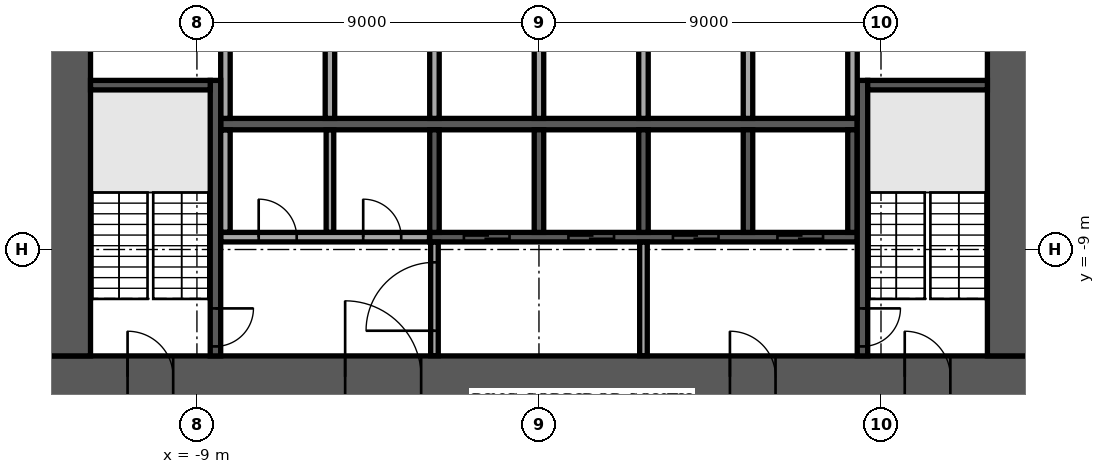
"""IFC4 building model, lengths in metres.
Left out: names, types, materials, properties, quantities, classifications, styles, units other than length and angle.
Written with IfcOpenShell. Run it as: python <this file> out.ifc"""

import sys

from ifc_helpers import new_model, si_unit, direction, frame, frame_2d, origin, place, context, subcontext, project, spatial, rectangle, extrude, element, fill, save


model = new_model("IFC4")
c1 = context("Model", 3, precision=1e-05, world=origin(), true_north=direction((0.0, 1.0)))
c2 = subcontext(c1, "Body", "Model", "MODEL_VIEW")
j1 = project(units=[si_unit("LENGTHUNIT", "METRE"), si_unit("PLANEANGLEUNIT", "RADIAN")], contexts=[c1])
p1 = place(None, origin())
s1 = spatial("IfcSite", under=j1, at=p1, CompositionType="ELEMENT")
p2 = place(p1, origin())
s2 = spatial("IfcBuilding", under=s1, at=p2, CompositionType="ELEMENT")
p3 = place(p2, frame((0.0, 0.0, 102.1)))
s3 = spatial("IfcBuildingStorey", under=s2, at=p3, CompositionType="ELEMENT", Elevation=102.1)
p4 = place(p3, frame((-12.9, -12.35, 0.0), z_axis=(0.0, 0.0, 1.0), x_axis=(1.0, 0.0, 0.0)))
e1 = element("IfcWall", 1, at=p4, inside=s3, PredefinedType="SHEAR", context=c2, shape_type="SweptSolid", body=[
    extrude(rectangle(XDim=25.8, YDim=1.1, at=frame_2d((12.9, 0.0))), origin(), (0.0, 0.0, 1.0), 3.58),
])
p5 = place(p4, frame((7.8, 0.0, 0.0)))
e2 = element("IfcOpeningElement", 2, at=p5, cuts=e1, PredefinedType="OPENING", context=c2, shape_type="SweptSolid", body=[
    extrude(rectangle(XDim=2.0, YDim=2.1, at=frame_2d((1.0, 1.05))), frame((0.0, 0.56, 0.0), z_axis=(0.0, -1.0, 0.0), x_axis=(1.0, 0.0, 0.0)), (0.0, 0.0, 1.0), 1.12),
])
p6 = place(p4, frame((17.925, 0.0, 0.0)))
e3 = element("IfcOpeningElement", 3, at=p6, cuts=e1, PredefinedType="OPENING", context=c2, shape_type="SweptSolid", body=[
    extrude(rectangle(XDim=1.2, YDim=2.1, at=frame_2d((0.6, 1.05))), frame((0.0, 0.56, 0.0), z_axis=(0.0, -1.0, 0.0), x_axis=(1.0, 0.0, 0.0)), (0.0, 0.0, 1.0), 1.12),
])
p7 = place(p4, frame((2.075, 0.0, 0.0)))
e4 = element("IfcOpeningElement", 4, at=p7, cuts=e1, PredefinedType="OPENING", context=c2, shape_type="SweptSolid", body=[
    extrude(rectangle(XDim=1.2, YDim=2.1, at=frame_2d((0.6, 1.05))), frame((0.0, 0.56, 0.0), z_axis=(0.0, -1.0, 0.0), x_axis=(1.0, 0.0, 0.0)), (0.0, 0.0, 1.0), 1.12),
])
p8 = place(p4, frame((22.525, 0.0, 0.0)))
e5 = element("IfcOpeningElement", 5, at=p8, cuts=e1, PredefinedType="OPENING", context=c2, shape_type="SweptSolid", body=[
    extrude(rectangle(XDim=1.2, YDim=2.1, at=frame_2d((0.6, 1.05))), frame((0.0, 0.56, 0.0), z_axis=(0.0, -1.0, 0.0), x_axis=(1.0, 0.0, 0.0)), (0.0, 0.0, 1.0), 1.12),
])
p9 = place(p3, frame((12.35, -11.8, 0.0), z_axis=(0.0, 0.0, 1.0), x_axis=(0.0, 1.0, 0.0)))
e6 = element("IfcWall", 6, at=p9, inside=s3, PredefinedType="SHEAR", context=c2, shape_type="SweptSolid", body=[
    extrude(rectangle(XDim=23.6, YDim=1.1, at=frame_2d((11.8, 0.0))), origin(), (0.0, 0.0, 1.0), 3.58),
])
p10 = place(p9, frame((10.6, 0.0, 0.0)))
e7 = element("IfcOpeningElement", 7, at=p10, cuts=e6, PredefinedType="OPENING", context=c2, shape_type="SweptSolid", body=[
    extrude(rectangle(XDim=2.4, YDim=2.4, at=frame_2d((1.2, 1.2))), frame((0.0, 0.56, 0.0), z_axis=(0.0, -1.0, 0.0), x_axis=(1.0, 0.0, 0.0)), (0.0, 0.0, 1.0), 1.12),
])
p11 = place(p3, frame((-12.35, -11.8, 0.0), z_axis=(0.0, 0.0, 1.0), x_axis=(0.0, 1.0, 0.0)))
e8 = element("IfcWall", 8, at=p11, inside=s3, PredefinedType="SHEAR", context=c2, shape_type="SweptSolid", body=[
    extrude(rectangle(XDim=23.6, YDim=1.1, at=frame_2d((11.8, 0.0))), origin(), (0.0, 0.0, 1.0), 3.58),
])
p12 = place(p11, frame((10.6, 0.0, 0.0)))
e9 = element("IfcOpeningElement", 9, at=p12, cuts=e8, PredefinedType="OPENING", context=c2, shape_type="SweptSolid", body=[
    extrude(rectangle(XDim=2.4, YDim=2.4, at=frame_2d((1.2, 1.2))), frame((0.0, 0.56, 0.0), z_axis=(0.0, -1.0, 0.0), x_axis=(1.0, 0.0, 0.0)), (0.0, 0.0, 1.0), 1.12),
])
p13 = place(p3, frame((-8.375, -5.7, 0.0), z_axis=(0.0, 0.0, 1.0), x_axis=(1.0, 0.0, 0.0)))
e10 = element("IfcWall", 10, at=p13, inside=s3, PredefinedType="SOLIDWALL", context=c2, shape_type="SweptSolid", body=[
    extrude(rectangle(XDim=16.75, YDim=0.3, at=frame_2d((8.375, 0.0))), origin(), (0.0, 0.0, 1.0), 3.58),
])
for number, where, z_axis, x_axis in (
    (11, (-8.25, -5.55, 0.0), (0.0, 0.0, 1.0), (0.0, 1.0, 0.0)),
    (12, (-5.5, -5.55, 0.0), (0.0, 0.0, 1.0), (0.0, 1.0, 0.0)),
    (13, (-2.75, -5.55, 0.0), (0.0, 0.0, 1.0), (0.0, 1.0, 0.0)),
    (14, (0.0, -5.55, 0.0), (0.0, 0.0, 1.0), (0.0, 1.0, 0.0)),
    (15, (2.75, -5.55, 0.0), (0.0, 0.0, 1.0), (0.0, 1.0, 0.0)),
    (16, (5.5, -5.55, 0.0), (0.0, 0.0, 1.0), (0.0, 1.0, 0.0)),
):
    element("IfcWall", number, at=place(p3, frame(where, z_axis=z_axis, x_axis=x_axis)), inside=s3, PredefinedType="SOLIDWALL", context=c2, shape_type="SweptSolid", body=[
        extrude(rectangle(XDim=2.7, YDim=0.25, at=frame_2d((1.35, 0.0))), origin(), (0.0, 0.0, 1.0), 3.58),
    ])
p14 = place(p3, frame((-2.875, -8.675, 0.0), z_axis=(0.0, 0.0, 1.0), x_axis=(1.0, 0.0, 0.0)))
e17 = element("IfcWall", 17, at=p14, inside=s3, PredefinedType="SOLIDWALL", context=c2, shape_type="SweptSolid", body=[
    extrude(rectangle(XDim=11.25, YDim=0.25, at=frame_2d((5.625, 0.0))), origin(), (0.0, 0.0, 1.0), 3.58),
])
p15 = place(p14, frame((0.9, 0.0, 0.0)))
e18 = element("IfcOpeningElement", 18, at=p15, cuts=e17, PredefinedType="OPENING", context=c2, shape_type="SweptSolid", body=[
    extrude(rectangle(XDim=1.2, YDim=2.1, at=frame_2d((0.6, 1.05))), frame((0.0, 0.135, 0.0), z_axis=(0.0, -1.0, 0.0), x_axis=(1.0, 0.0, 0.0)), (0.0, 0.0, 1.0), 0.27),
])
p16 = place(p14, frame((3.65, 0.0, 0.0)))
e19 = element("IfcOpeningElement", 19, at=p16, cuts=e17, PredefinedType="OPENING", context=c2, shape_type="SweptSolid", body=[
    extrude(rectangle(XDim=1.2, YDim=2.1, at=frame_2d((0.6, 1.05))), frame((0.0, 0.135, 0.0), z_axis=(0.0, -1.0, 0.0), x_axis=(1.0, 0.0, 0.0)), (0.0, 0.0, 1.0), 0.27),
])
p17 = place(p14, frame((6.4, 0.0, 0.0)))
e20 = element("IfcOpeningElement", 20, at=p17, cuts=e17, PredefinedType="OPENING", context=c2, shape_type="SweptSolid", body=[
    extrude(rectangle(XDim=1.2, YDim=2.1, at=frame_2d((0.6, 1.05))), frame((0.0, 0.135, 0.0), z_axis=(0.0, -1.0, 0.0), x_axis=(1.0, 0.0, 0.0)), (0.0, 0.0, 1.0), 0.27),
])
p18 = place(p14, frame((9.15, 0.0, 0.0)))
e21 = element("IfcOpeningElement", 21, at=p18, cuts=e17, PredefinedType="OPENING", context=c2, shape_type="SweptSolid", body=[
    extrude(rectangle(XDim=1.2, YDim=2.1, at=frame_2d((0.6, 1.05))), frame((0.0, 0.135, 0.0), z_axis=(0.0, -1.0, 0.0), x_axis=(1.0, 0.0, 0.0)), (0.0, 0.0, 1.0), 0.27),
])
for number, where, z_axis, x_axis in (
    (22, (-2.75, -8.55, 0.0), (0.0, 0.0, 1.0), (0.0, 1.0, 0.0)),
    (23, (0.0, -8.55, 0.0), (0.0, 0.0, 1.0), (0.0, 1.0, 0.0)),
    (24, (2.75, -8.55, 0.0), (0.0, 0.0, 1.0), (0.0, 1.0, 0.0)),
    (25, (5.5, -8.55, 0.0), (0.0, 0.0, 1.0), (0.0, 1.0, 0.0)),
    (26, (8.25, -8.55, 0.0), (0.0, 0.0, 1.0), (0.0, 1.0, 0.0)),
):
    element("IfcWall", number, at=place(p3, frame(where, z_axis=z_axis, x_axis=x_axis)), inside=s3, PredefinedType="SOLIDWALL", context=c2, shape_type="SweptSolid", body=[
        extrude(rectangle(XDim=2.7, YDim=0.25, at=frame_2d((1.35, 0.0))), origin(), (0.0, 0.0, 1.0), 3.58),
    ])
p19 = place(p3, frame((-8.512, -4.55, 0.0), z_axis=(0.0, 0.0, 1.0), x_axis=(0.0, -1.0, 0.0)))
e27 = element("IfcWall", 27, at=p19, inside=s3, PredefinedType="SOLIDWALL", context=c2, shape_type="SweptSolid", body=[
    extrude(rectangle(XDim=7.25, YDim=0.275, at=frame_2d((3.625, 0.0))), origin(), (0.0, 0.0, 1.0), 3.58),
])
p20 = place(p19, frame((6.0, 0.0, 0.0)))
e28 = element("IfcOpeningElement", 28, at=p20, cuts=e27, PredefinedType="OPENING", context=c2, shape_type="SweptSolid", body=[
    extrude(rectangle(XDim=1.0, YDim=2.1, at=frame_2d((0.5, 1.05))), frame((0.0, 0.147, 0.0), z_axis=(0.0, -1.0, 0.0), x_axis=(1.0, 0.0, 0.0)), (0.0, 0.0, 1.0), 0.295),
])
p21 = place(p3, frame((-8.65, -4.675, 0.0), z_axis=(0.0, 0.0, 1.0), x_axis=(-1.0, 0.0, 0.0)))
e29 = element("IfcWall", 29, at=p21, inside=s3, PredefinedType="SOLIDWALL", context=c2, shape_type="SweptSolid", body=[
    extrude(rectangle(XDim=3.15, YDim=0.25, at=frame_2d((1.575, 0.0))), origin(), (0.0, 0.0, 1.0), 3.58),
])
p22 = place(p3, frame((8.512, -4.55, 0.0), z_axis=(0.0, 0.0, 1.0), x_axis=(0.0, -1.0, 0.0)))
e30 = element("IfcWall", 30, at=p22, inside=s3, PredefinedType="SOLIDWALL", context=c2, shape_type="SweptSolid", body=[
    extrude(rectangle(XDim=7.25, YDim=0.275, at=frame_2d((3.625, 0.0))), origin(), (0.0, 0.0, 1.0), 3.58),
])
p23 = place(p22, frame((6.0, 0.0, 0.0)))
e31 = element("IfcOpeningElement", 31, at=p23, cuts=e30, PredefinedType="OPENING", context=c2, shape_type="SweptSolid", body=[
    extrude(rectangle(XDim=1.0, YDim=2.1, at=frame_2d((0.5, 1.05))), frame((0.0, 0.147, 0.0), z_axis=(0.0, -1.0, 0.0), x_axis=(1.0, 0.0, 0.0)), (0.0, 0.0, 1.0), 0.295),
])
p24 = place(p3, frame((8.65, -4.675, 0.0), z_axis=(0.0, 0.0, 1.0), x_axis=(1.0, 0.0, 0.0)))
e32 = element("IfcWall", 32, at=p24, inside=s3, PredefinedType="SOLIDWALL", context=c2, shape_type="SweptSolid", body=[
    extrude(rectangle(XDim=3.15, YDim=0.25, at=frame_2d((1.575, 0.0))), origin(), (0.0, 0.0, 1.0), 3.58),
])
p25 = place(p3, frame((-2.75, -11.795, 0.0), z_axis=(0.0, 0.0, 1.0), x_axis=(0.0, 1.0, 0.0)))
e33 = element("IfcWall", 33, at=p25, inside=s3, PredefinedType="PARTITIONING", context=c2, shape_type="SweptSolid", body=[
    extrude(rectangle(XDim=2.99, YDim=0.2, at=frame_2d((1.495, 0.0))), origin(), (0.0, 0.0, 1.0), 3.58),
])
p26 = place(p25, frame((0.657, 0.0, 0.0)))
e34 = element("IfcOpeningElement", 34, at=p26, cuts=e33, PredefinedType="OPENING", context=c2, shape_type="SweptSolid", body=[
    extrude(rectangle(XDim=1.8, YDim=2.1, at=frame_2d((0.9, 1.05))), frame((0.0, 0.11, 0.0), z_axis=(0.0, -1.0, 0.0), x_axis=(1.0, 0.0, 0.0)), (0.0, 0.0, 1.0), 0.22),
])
p27 = place(p3, frame((2.75, -11.795, 0.0), z_axis=(0.0, 0.0, 1.0), x_axis=(0.0, 1.0, 0.0)))
e35 = element("IfcWall", 35, at=p27, inside=s3, PredefinedType="PARTITIONING", context=c2, shape_type="SweptSolid", body=[
    extrude(rectangle(XDim=2.99, YDim=0.2, at=frame_2d((1.495, 0.0))), origin(), (0.0, 0.0, 1.0), 3.58),
])
p28 = place(p3, frame((-8.37, -8.675, 0.0), z_axis=(0.0, 0.0, 1.0), x_axis=(1.0, 0.0, 0.0)))
e36 = element("IfcWall", 36, at=p28, inside=s3, PredefinedType="PARTITIONING", context=c2, shape_type="SweptSolid", body=[
    extrude(rectangle(XDim=5.49, YDim=0.25, at=frame_2d((2.745, 0.0))), origin(), (0.0, 0.0, 1.0), 3.58),
])
p29 = place(p28, frame((0.995, 0.0, 0.0)))
e37 = element("IfcOpeningElement", 37, at=p29, cuts=e36, PredefinedType="OPENING", context=c2, shape_type="SweptSolid", body=[
    extrude(rectangle(XDim=1.0, YDim=2.1, at=frame_2d((0.5, 1.05))), frame((0.0, 0.135, 0.0), z_axis=(0.0, -1.0, 0.0), x_axis=(1.0, 0.0, 0.0)), (0.0, 0.0, 1.0), 0.27),
])
p30 = place(p28, frame((3.745, 0.0, 0.0)))
e38 = element("IfcOpeningElement", 38, at=p30, cuts=e36, PredefinedType="OPENING", context=c2, shape_type="SweptSolid", body=[
    extrude(rectangle(XDim=1.0, YDim=2.1, at=frame_2d((0.5, 1.05))), frame((0.0, 0.135, 0.0), z_axis=(0.0, -1.0, 0.0), x_axis=(1.0, 0.0, 0.0)), (0.0, 0.0, 1.0), 0.27),
])
p31 = place(p3, frame((-8.25, -8.545, 0.0), z_axis=(0.0, 0.0, 1.0), x_axis=(0.0, 1.0, 0.0)))
e39 = element("IfcWall", 39, at=p31, inside=s3, PredefinedType="PARTITIONING", context=c2, shape_type="SweptSolid", body=[
    extrude(rectangle(XDim=2.69, YDim=0.25, at=frame_2d((1.345, 0.0))), origin(), (0.0, 0.0, 1.0), 3.58),
])
p32 = place(p3, frame((-5.5, -8.545, 0.0), z_axis=(0.0, 0.0, 1.0), x_axis=(0.0, 1.0, 0.0)))
e40 = element("IfcWall", 40, at=p32, inside=s3, PredefinedType="PARTITIONING", context=c2, shape_type="SweptSolid", body=[
    extrude(rectangle(XDim=2.69, YDim=0.2, at=frame_2d((1.345, 0.0))), origin(), (0.0, 0.0, 1.0), 3.58),
])
p33 = place(p3, frame((8.25, -5.545, 0.0), z_axis=(0.0, 0.0, 1.0), x_axis=(0.0, 1.0, 0.0)))
e41 = element("IfcWall", 41, at=p33, inside=s3, PredefinedType="PARTITIONING", context=c2, shape_type="SweptSolid", body=[
    extrude(rectangle(XDim=2.69, YDim=0.25, at=frame_2d((1.345, 0.0))), origin(), (0.0, 0.0, 1.0), 3.58),
])
p34 = place(p5, origin())
e42 = element("IfcDoor", 42, at=p34, inside=s3, OperationType="SINGLE_SWING_LEFT", PredefinedType="DOOR", context=c2, shape_type="SweptSolid", body=[
    extrude(rectangle(XDim=2.0, YDim=2.1, at=frame_2d((1.0, 1.05))), frame((0.0, 0.025, 0.0), z_axis=(0.0, -1.0, 0.0), x_axis=(1.0, 0.0, 0.0)), (0.0, 0.0, 1.0), 0.05),
])
fill(e2, e42)
p35 = place(p6, origin())
e43 = element("IfcDoor", 43, at=p35, inside=s3, OperationType="SINGLE_SWING_LEFT", PredefinedType="DOOR", context=c2, shape_type="SweptSolid", body=[
    extrude(rectangle(XDim=1.2, YDim=2.1, at=frame_2d((0.6, 1.05))), frame((0.0, 0.025, 0.0), z_axis=(0.0, -1.0, 0.0), x_axis=(1.0, 0.0, 0.0)), (0.0, 0.0, 1.0), 0.05),
])
fill(e3, e43)
p36 = place(p7, origin())
e44 = element("IfcDoor", 44, at=p36, inside=s3, OperationType="SINGLE_SWING_LEFT", PredefinedType="DOOR", context=c2, shape_type="SweptSolid", body=[
    extrude(rectangle(XDim=1.2, YDim=2.1, at=frame_2d((0.6, 1.05))), frame((0.0, 0.025, 0.0), z_axis=(0.0, -1.0, 0.0), x_axis=(1.0, 0.0, 0.0)), (0.0, 0.0, 1.0), 0.05),
])
fill(e4, e44)
p37 = place(p8, origin())
e45 = element("IfcDoor", 45, at=p37, inside=s3, OperationType="SINGLE_SWING_LEFT", PredefinedType="DOOR", context=c2, shape_type="SweptSolid", body=[
    extrude(rectangle(XDim=1.2, YDim=2.1, at=frame_2d((0.6, 1.05))), frame((0.0, 0.025, 0.0), z_axis=(0.0, -1.0, 0.0), x_axis=(1.0, 0.0, 0.0)), (0.0, 0.0, 1.0), 0.05),
])
fill(e5, e45)
p38 = place(p15, origin())
e46 = element("IfcDoor", 46, at=p38, inside=s3, OperationType="DOUBLE_DOOR_SLIDING", PredefinedType="DOOR", context=c2, shape_type="SweptSolid", body=[
    extrude(rectangle(XDim=1.2, YDim=2.1, at=frame_2d((0.6, 1.05))), frame((0.0, 0.025, 0.0), z_axis=(0.0, -1.0, 0.0), x_axis=(1.0, 0.0, 0.0)), (0.0, 0.0, 1.0), 0.05),
])
fill(e18, e46)
p39 = place(p16, origin())
e47 = element("IfcDoor", 47, at=p39, inside=s3, OperationType="DOUBLE_DOOR_SLIDING", PredefinedType="DOOR", context=c2, shape_type="SweptSolid", body=[
    extrude(rectangle(XDim=1.2, YDim=2.1, at=frame_2d((0.6, 1.05))), frame((0.0, 0.025, 0.0), z_axis=(0.0, -1.0, 0.0), x_axis=(1.0, 0.0, 0.0)), (0.0, 0.0, 1.0), 0.05),
])
fill(e19, e47)
p40 = place(p17, origin())
e48 = element("IfcDoor", 48, at=p40, inside=s3, OperationType="DOUBLE_DOOR_SLIDING", PredefinedType="DOOR", context=c2, shape_type="SweptSolid", body=[
    extrude(rectangle(XDim=1.2, YDim=2.1, at=frame_2d((0.6, 1.05))), frame((0.0, 0.025, 0.0), z_axis=(0.0, -1.0, 0.0), x_axis=(1.0, 0.0, 0.0)), (0.0, 0.0, 1.0), 0.05),
])
fill(e20, e48)
p41 = place(p18, origin())
e49 = element("IfcDoor", 49, at=p41, inside=s3, OperationType="DOUBLE_DOOR_SLIDING", PredefinedType="DOOR", context=c2, shape_type="SweptSolid", body=[
    extrude(rectangle(XDim=1.2, YDim=2.1, at=frame_2d((0.6, 1.05))), frame((0.0, 0.025, 0.0), z_axis=(0.0, -1.0, 0.0), x_axis=(1.0, 0.0, 0.0)), (0.0, 0.0, 1.0), 0.05),
])
fill(e21, e49)
p42 = place(p20, origin())
e50 = element("IfcDoor", 50, at=p42, inside=s3, OperationType="SINGLE_SWING_LEFT", PredefinedType="DOOR", context=c2, shape_type="SweptSolid", body=[
    extrude(rectangle(XDim=1.0, YDim=2.1, at=frame_2d((0.5, 1.05))), frame((0.0, 0.025, 0.0), z_axis=(0.0, -1.0, 0.0), x_axis=(1.0, 0.0, 0.0)), (0.0, 0.0, 1.0), 0.05),
])
fill(e28, e50)
p43 = place(p23, origin())
e51 = element("IfcDoor", 51, at=p43, inside=s3, OperationType="SINGLE_SWING_LEFT", PredefinedType="DOOR", context=c2, shape_type="SweptSolid", body=[
    extrude(rectangle(XDim=1.0, YDim=2.1, at=frame_2d((0.5, 1.05))), frame((0.0, 0.025, 0.0), z_axis=(0.0, -1.0, 0.0), x_axis=(1.0, 0.0, 0.0)), (0.0, 0.0, 1.0), 0.05),
])
fill(e31, e51)
p44 = place(p29, origin())
e52 = element("IfcDoor", 52, at=p44, inside=s3, OperationType="SINGLE_SWING_RIGHT", PredefinedType="DOOR", context=c2, shape_type="SweptSolid", body=[
    extrude(rectangle(XDim=1.0, YDim=2.1, at=frame_2d((0.5, 1.05))), frame((0.0, 0.025, 0.0), z_axis=(0.0, -1.0, 0.0), x_axis=(1.0, 0.0, 0.0)), (0.0, 0.0, 1.0), 0.05),
])
fill(e37, e52)
p45 = place(p30, origin())
e53 = element("IfcDoor", 53, at=p45, inside=s3, OperationType="SINGLE_SWING_RIGHT", PredefinedType="DOOR", context=c2, shape_type="SweptSolid", body=[
    extrude(rectangle(XDim=1.0, YDim=2.1, at=frame_2d((0.5, 1.05))), frame((0.0, 0.025, 0.0), z_axis=(0.0, -1.0, 0.0), x_axis=(1.0, 0.0, 0.0)), (0.0, 0.0, 1.0), 0.05),
])
fill(e38, e53)
p46 = place(p26, origin())
e54 = element("IfcDoor", 54, at=p46, inside=s3, OperationType="SINGLE_SWING_LEFT", PredefinedType="DOOR", context=c2, shape_type="SweptSolid", body=[
    extrude(rectangle(XDim=1.8, YDim=2.1, at=frame_2d((0.9, 1.05))), frame((0.0, 0.025, 0.0), z_axis=(0.0, -1.0, 0.0), x_axis=(1.0, 0.0, 0.0)), (0.0, 0.0, 1.0), 0.05),
])
fill(e34, e54)
save(model, sys.argv[1])
